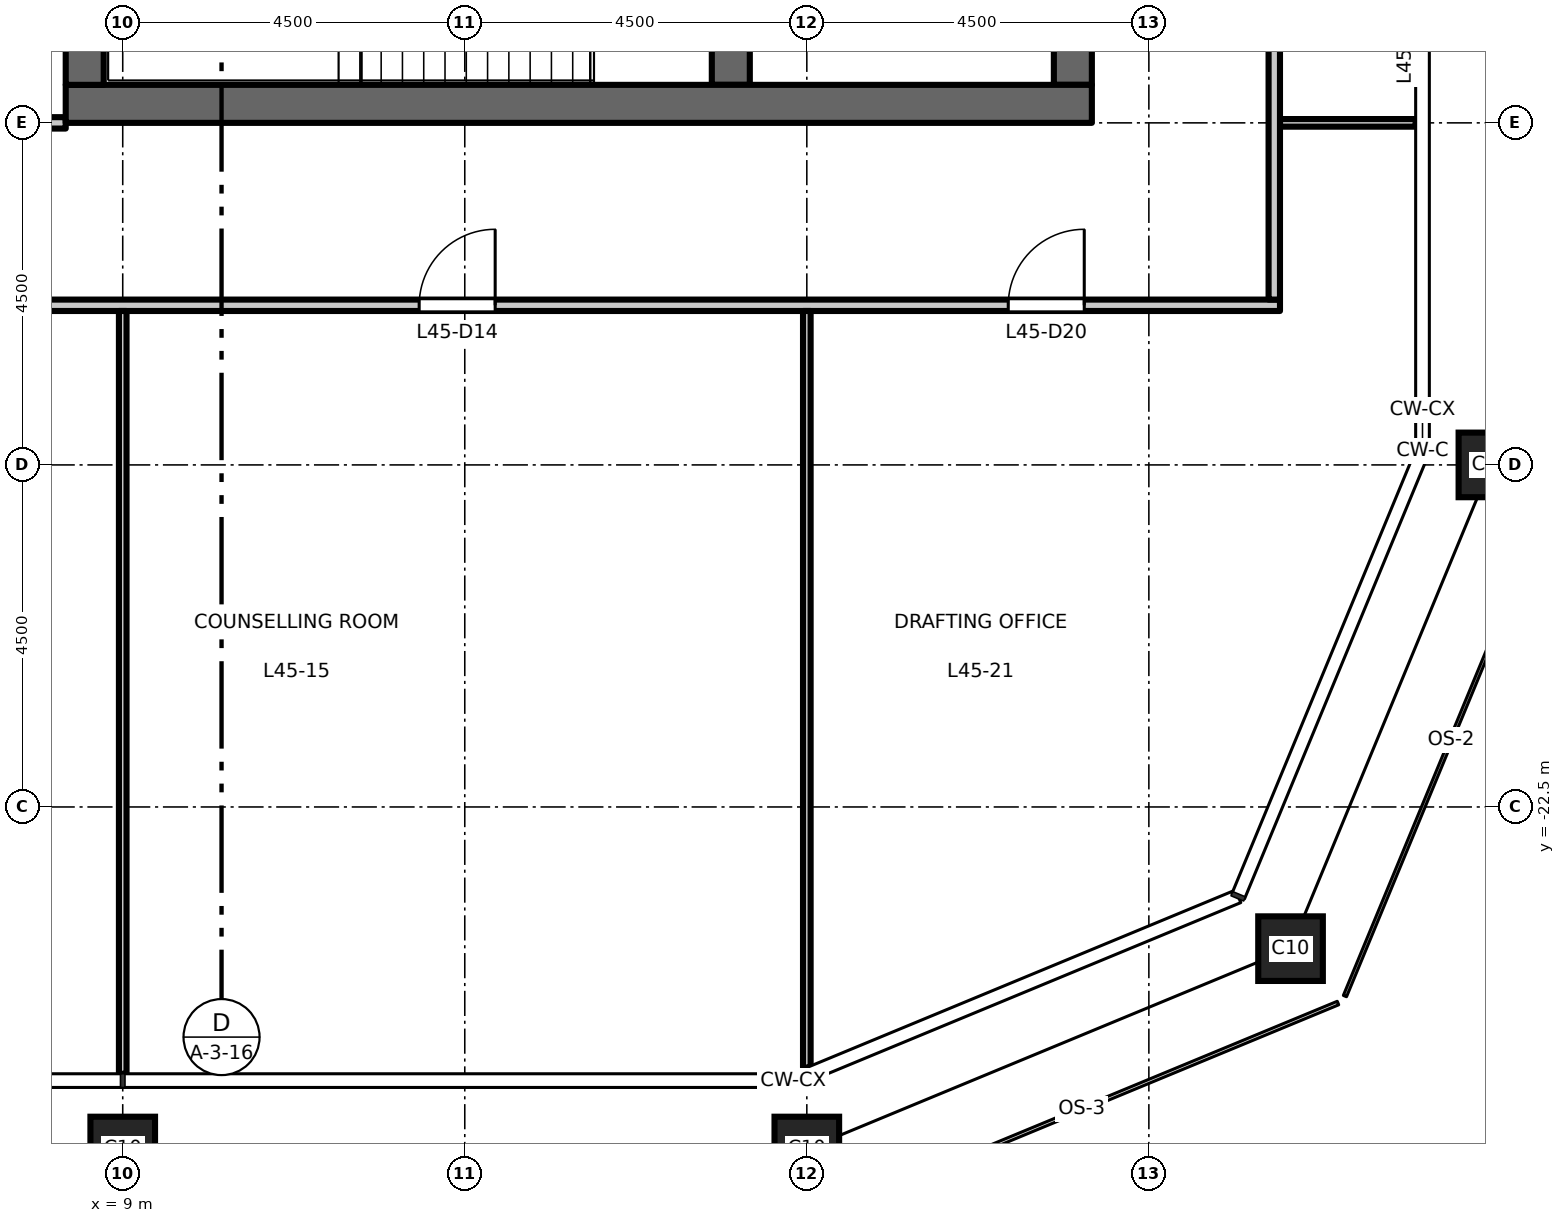
"""IFC4 building model, lengths in metres.
Left out: names, types, materials, properties, quantities, classifications, styles, units other than length and angle.
Written with IfcOpenShell. Run it as: python <this file> out.ifc"""

import sys

from ifc_helpers import new_model, si_unit, direction, frame, frame_2d, origin, origin_2d, place, context, subcontext, project, spatial, rectangle, hollow_rectangle, extrude, element, fill, save


model = new_model("IFC4")
c1 = context("Model", 3, precision=1e-05, world=origin(), true_north=direction((0.0, 1.0)))
c2 = subcontext(c1, "Body", "Model", "MODEL_VIEW")
j1 = project(units=[si_unit("LENGTHUNIT", "METRE"), si_unit("PLANEANGLEUNIT", "RADIAN")], contexts=[c1])
p1 = place(None, origin())
s1 = spatial("IfcSite", under=j1, at=p1, CompositionType="ELEMENT")
p2 = place(p1, origin())
s2 = spatial("IfcBuilding", under=s1, at=p2, CompositionType="ELEMENT")
p3 = place(p2, frame((0.0, 0.0, 210.7)))
s3 = spatial("IfcBuildingStorey", under=s2, at=p3, CompositionType="ELEMENT", Elevation=210.7)
for number, where, z_axis, x_axis in (
    (1, (9.0, -27.0, 0.0), (0.0, 0.0, 1.0), (1.0, 0.0, 0.0)),
    (2, (18.0, -27.0, 0.0), (0.0, 0.0, 1.0), (1.0, 0.0, 0.0)),
    (3, (24.364, -24.364, 0.0), (0.0, 0.0, 1.0), (1.0, 0.0, 0.0)),
    (4, (27.0, -18.0, 0.0), (0.0, 0.0, 1.0), (1.0, 0.0, 0.0)),
):
    element("IfcColumn", number, at=place(p3, frame(where, z_axis=z_axis, x_axis=x_axis)), inside=s3, PredefinedType="COLUMN", context=c2, shape_type="SweptSolid", body=[
        extrude(hollow_rectangle(XDim=0.85, YDim=0.85, WallThickness=0.05, at=origin_2d()), origin(), (0.0, 0.0, 1.0), 4.5),
    ])
p4 = place(p3, frame((21.5, -13.0, 0.0), z_axis=(0.0, 0.0, 1.0), x_axis=(0.0, 1.0, 0.0)))
e5 = element("IfcWall", 5, at=p4, inside=s3, PredefinedType="SHEAR", context=c2, shape_type="SweptSolid", body=[
    extrude(rectangle(XDim=26.0, YDim=0.5, at=frame_2d((13.0, 0.0))), origin(), (0.0, 0.0, 1.0), 4.35),
])
p5 = place(p4, frame((16.825, 0.0, 0.0)))
e6 = element("IfcOpeningElement", 6, at=p5, cuts=e5, PredefinedType="OPENING", context=c2, shape_type="SweptSolid", body=[
    extrude(rectangle(XDim=1.8, YDim=2.1, at=frame_2d((0.9, 1.05))), frame((0.0, 0.26, 0.0), z_axis=(0.0, -1.0, 0.0), x_axis=(1.0, 0.0, 0.0)), (0.0, 0.0, 1.0), 0.52),
])
p6 = place(p4, frame((7.375, 0.0, 0.0)))
e7 = element("IfcOpeningElement", 7, at=p6, cuts=e5, PredefinedType="OPENING", context=c2, shape_type="SweptSolid", body=[
    extrude(rectangle(XDim=1.8, YDim=2.1, at=frame_2d((0.9, 1.05))), frame((0.0, 0.26, 0.0), z_axis=(0.0, -1.0, 0.0), x_axis=(1.0, 0.0, 0.0)), (0.0, 0.0, 1.0), 0.52),
])
p7 = place(p3, frame((17.0, -13.0, 0.0), z_axis=(0.0, 0.0, 1.0), x_axis=(0.0, 1.0, 0.0)))
e8 = element("IfcWall", 8, at=p7, inside=s3, PredefinedType="SHEAR", context=c2, shape_type="SweptSolid", body=[
    extrude(rectangle(XDim=6.575, YDim=0.5, at=frame_2d((3.288, 0.0))), origin(), (0.0, 0.0, 1.0), 4.35),
])
p8 = place(p3, frame((8.25, -13.25, 0.0), z_axis=(0.0, 0.0, 1.0), x_axis=(1.0, 0.0, 0.0)))
e9 = element("IfcWall", 9, at=p8, inside=s3, PredefinedType="SHEAR", context=c2, shape_type="SweptSolid", body=[
    extrude(rectangle(XDim=13.5, YDim=0.5, at=frame_2d((6.75, 0.0))), origin(), (0.0, 0.0, 1.0), 4.35),
])
p9 = place(p3, frame((8.5, -13.0, 0.0), z_axis=(0.0, 0.0, 1.0), x_axis=(0.0, 1.0, 0.0)))
e10 = element("IfcWall", 10, at=p9, inside=s3, PredefinedType="SHEAR", context=c2, shape_type="SweptSolid", body=[
    extrude(rectangle(XDim=26.0, YDim=0.5, at=frame_2d((13.0, 0.0))), origin(), (0.0, 0.0, 1.0), 4.35),
])
p10 = place(p3, frame((-24.225, -15.9, 0.0), z_axis=(0.0, 0.0, 1.0), x_axis=(1.0, 0.0, 0.0)))
e11 = element("IfcWall", 11, at=p10, inside=s3, PredefinedType="PARTITIONING", context=c2, shape_type="SweptSolid", body=[
    extrude(rectangle(XDim=48.45, YDim=0.15, at=frame_2d((24.225, 0.0))), origin(), (0.0, 0.0, 1.0), 4.35),
])
p11 = place(p10, frame((10.125, 0.0, 0.0)))
e12 = element("IfcOpeningElement", 12, at=p11, cuts=e11, PredefinedType="OPENING", context=c2, shape_type="SweptSolid", body=[
    extrude(rectangle(XDim=1.0, YDim=2.1, at=frame_2d((0.5, 1.05))), frame((0.0, 0.085, 0.0), z_axis=(0.0, -1.0, 0.0), x_axis=(1.0, 0.0, 0.0)), (0.0, 0.0, 1.0), 0.17),
])
p12 = place(p10, frame((19.125, 0.0, 0.0)))
e13 = element("IfcOpeningElement", 13, at=p12, cuts=e11, PredefinedType="OPENING", context=c2, shape_type="SweptSolid", body=[
    extrude(rectangle(XDim=1.0, YDim=2.1, at=frame_2d((0.5, 1.05))), frame((0.0, 0.085, 0.0), z_axis=(0.0, -1.0, 0.0), x_axis=(1.0, 0.0, 0.0)), (0.0, 0.0, 1.0), 0.17),
])
p13 = place(p10, frame((28.125, 0.0, 0.0)))
e14 = element("IfcOpeningElement", 14, at=p13, cuts=e11, PredefinedType="OPENING", context=c2, shape_type="SweptSolid", body=[
    extrude(rectangle(XDim=1.0, YDim=2.1, at=frame_2d((0.5, 1.05))), frame((0.0, 0.085, 0.0), z_axis=(0.0, -1.0, 0.0), x_axis=(1.0, 0.0, 0.0)), (0.0, 0.0, 1.0), 0.17),
])
p14 = place(p10, frame((37.125, 0.0, 0.0)))
e15 = element("IfcOpeningElement", 15, at=p14, cuts=e11, PredefinedType="OPENING", context=c2, shape_type="SweptSolid", body=[
    extrude(rectangle(XDim=1.0, YDim=2.1, at=frame_2d((0.5, 1.05))), frame((0.0, 0.085, 0.0), z_axis=(0.0, -1.0, 0.0), x_axis=(1.0, 0.0, 0.0)), (0.0, 0.0, 1.0), 0.17),
])
p15 = place(p10, frame((44.875, 0.0, 0.0)))
e16 = element("IfcOpeningElement", 16, at=p15, cuts=e11, PredefinedType="OPENING", context=c2, shape_type="SweptSolid", body=[
    extrude(rectangle(XDim=1.0, YDim=2.1, at=frame_2d((0.5, 1.05))), frame((0.0, 0.085, 0.0), z_axis=(0.0, -1.0, 0.0), x_axis=(1.0, 0.0, 0.0)), (0.0, 0.0, 1.0), 0.17),
])
p16 = place(p3, frame((24.225, -13.5, 0.0), z_axis=(0.0, 0.0, 1.0), x_axis=(1.0, 0.0, 0.0)))
e17 = element("IfcWall", 17, at=p16, inside=s3, PredefinedType="PARTITIONING", context=c2, shape_type="SweptSolid", body=[
    extrude(rectangle(XDim=1.785, YDim=0.1, at=frame_2d((0.893, 0.0))), origin(), (0.0, 0.0, 1.0), 3.95),
])
p17 = place(p3, frame((-8.25, -13.5, 0.0), z_axis=(0.0, 0.0, 1.0), x_axis=(1.0, 0.0, 0.0)))
e18 = element("IfcWall", 18, at=p17, inside=s3, PredefinedType="PARTITIONING", context=c2, shape_type="SweptSolid", body=[
    extrude(rectangle(XDim=16.5, YDim=0.15, at=frame_2d((8.25, 0.0))), origin(), (0.0, 0.0, 1.0), 3.95),
])
p18 = place(p17, frame((7.85, 0.0, 0.0)))
e19 = element("IfcOpeningElement", 19, at=p18, cuts=e18, PredefinedType="OPENING", context=c2, shape_type="SweptSolid", body=[
    extrude(rectangle(XDim=1.0, YDim=2.1, at=frame_2d((0.5, 1.05))), frame((0.0, 0.085, 0.0), z_axis=(0.0, -1.0, 0.0), x_axis=(1.0, 0.0, 0.0)), (0.0, 0.0, 1.0), 0.17),
])
p19 = place(p3, frame((9.0, -26.01, 0.0), z_axis=(0.0, 0.0, 1.0), x_axis=(0.0, 1.0, 0.0)))
e20 = element("IfcWall", 20, at=p19, inside=s3, PredefinedType="PARTITIONING", context=c2, shape_type="SweptSolid", body=[
    extrude(rectangle(XDim=10.035, YDim=0.1, at=frame_2d((5.018, 0.0))), origin(), (0.0, 0.0, 1.0), 3.65),
])
p20 = place(p3, frame((18.0, -25.928, 0.0), z_axis=(0.0, 0.0, 1.0), x_axis=(0.0, 1.0, 0.0)))
e21 = element("IfcWall", 21, at=p20, inside=s3, PredefinedType="PARTITIONING", context=c2, shape_type="SweptSolid", body=[
    extrude(rectangle(XDim=9.953, YDim=0.1, at=frame_2d((4.977, 0.0))), origin(), (0.0, 0.0, 1.0), 3.65),
])
p21 = place(p3, frame((24.15, -15.825, 0.0), z_axis=(0.0, 0.0, 1.0), x_axis=(0.0, 1.0, 0.0)))
e22 = element("IfcWall", 22, at=p21, inside=s3, PredefinedType="PARTITIONING", context=c2, shape_type="SweptSolid", body=[
    extrude(rectangle(XDim=31.65, YDim=0.15, at=frame_2d((15.825, 0.0))), origin(), (0.0, 0.0, 1.0), 4.35),
])
p22 = place(p21, frame((29.975, 0.0, 0.0)))
e23 = element("IfcOpeningElement", 23, at=p22, cuts=e22, PredefinedType="OPENING", context=c2, shape_type="SweptSolid", body=[
    extrude(rectangle(XDim=1.0, YDim=2.1, at=frame_2d((0.5, 1.05))), frame((0.0, 0.085, 0.0), z_axis=(0.0, -1.0, 0.0), x_axis=(1.0, 0.0, 0.0)), (0.0, 0.0, 1.0), 0.17),
])
p23 = place(p21, frame((3.975, 0.0, 0.0)))
e24 = element("IfcOpeningElement", 24, at=p23, cuts=e22, PredefinedType="OPENING", context=c2, shape_type="SweptSolid", body=[
    extrude(rectangle(XDim=1.0, YDim=2.1, at=frame_2d((0.5, 1.05))), frame((0.0, 0.085, 0.0), z_axis=(0.0, -1.0, 0.0), x_axis=(1.0, 0.0, 0.0)), (0.0, 0.0, 1.0), 0.17),
])
p24 = place(p21, frame((10.725, 0.0, 0.0)))
e25 = element("IfcOpeningElement", 25, at=p24, cuts=e22, PredefinedType="OPENING", context=c2, shape_type="SweptSolid", body=[
    extrude(rectangle(XDim=1.0, YDim=2.1, at=frame_2d((0.5, 1.05))), frame((0.0, 0.085, 0.0), z_axis=(0.0, -1.0, 0.0), x_axis=(1.0, 0.0, 0.0)), (0.0, 0.0, 1.0), 0.17),
])
p25 = place(p21, frame((19.725, 0.0, 0.0)))
e26 = element("IfcOpeningElement", 26, at=p25, cuts=e22, PredefinedType="OPENING", context=c2, shape_type="SweptSolid", body=[
    extrude(rectangle(XDim=1.0, YDim=2.1, at=frame_2d((0.5, 1.05))), frame((0.0, 0.085, 0.0), z_axis=(0.0, -1.0, 0.0), x_axis=(1.0, 0.0, 0.0)), (0.0, 0.0, 1.0), 0.17),
])
p26 = place(p21, frame((26.475, 0.0, 0.0)))
e27 = element("IfcOpeningElement", 27, at=p26, cuts=e22, PredefinedType="OPENING", context=c2, shape_type="SweptSolid", body=[
    extrude(rectangle(XDim=1.0, YDim=2.1, at=frame_2d((0.5, 1.05))), frame((0.0, 0.085, 0.0), z_axis=(0.0, -1.0, 0.0), x_axis=(1.0, 0.0, 0.0)), (0.0, 0.0, 1.0), 0.17),
])
p27 = place(p14, origin())
e28 = element("IfcDoor", 28, at=p27, inside=s3, OperationType="SINGLE_SWING_RIGHT", PredefinedType="DOOR", context=c2, shape_type="SweptSolid", body=[
    extrude(rectangle(XDim=1.0, YDim=2.1, at=frame_2d((0.5, 1.05))), frame((0.0, 0.025, 0.0), z_axis=(0.0, -1.0, 0.0), x_axis=(1.0, 0.0, 0.0)), (0.0, 0.0, 1.0), 0.05),
])
fill(e15, e28)
p28 = place(p15, origin())
e29 = element("IfcDoor", 29, at=p28, inside=s3, OperationType="SINGLE_SWING_RIGHT", PredefinedType="DOOR", context=c2, shape_type="SweptSolid", body=[
    extrude(rectangle(XDim=1.0, YDim=2.1, at=frame_2d((0.5, 1.05))), frame((0.0, 0.025, 0.0), z_axis=(0.0, -1.0, 0.0), x_axis=(1.0, 0.0, 0.0)), (0.0, 0.0, 1.0), 0.05),
])
fill(e16, e29)
save(model, sys.argv[1])
